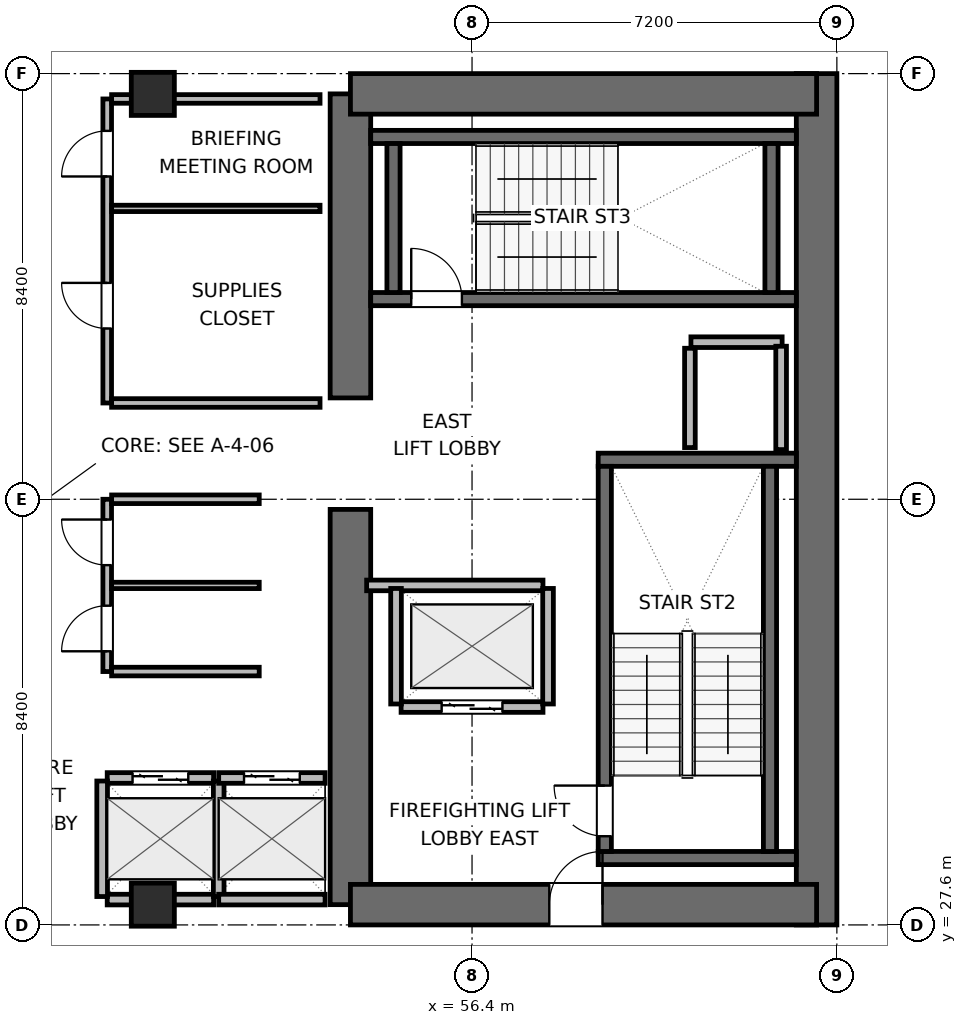
"""IFC4 building model, lengths in metres.
Left out: names, types, materials, properties, quantities, classifications, styles, units other than length and angle.
Written with IfcOpenShell. Run it as: python <this file> out.ifc"""

import sys

from ifc_helpers import new_model, si_unit, direction, frame, frame_2d, origin, origin_2d, place, context, subcontext, project, spatial, rectangle, extrude, element, fill, save


model = new_model("IFC4")
c1 = context("Model", 3, precision=1e-05, world=origin(), true_north=direction((0.0, 1.0)))
c2 = subcontext(c1, "Body", "Model", "MODEL_VIEW")
j1 = project(units=[si_unit("LENGTHUNIT", "METRE"), si_unit("PLANEANGLEUNIT", "RADIAN")], contexts=[c1])
p1 = place(None, origin())
s1 = spatial("IfcSite", under=j1, at=p1, CompositionType="ELEMENT")
p2 = place(p1, origin())
s2 = spatial("IfcBuilding", under=s1, at=p2, CompositionType="ELEMENT")
p3 = place(p2, frame((0.0, 0.0, 109.2)))
s3 = spatial("IfcBuildingStorey", under=s2, at=p3, CompositionType="ELEMENT", Elevation=109.2)
p4 = place(p3, frame((54.0, 28.0, 0.0), z_axis=(0.0, 0.0, 1.0), x_axis=(0.0, 1.0, 0.0)))
e1 = element("IfcWall", 1, at=p4, inside=s3, PredefinedType="SHEAR", context=c2, shape_type="SweptSolid", body=[
    extrude(rectangle(XDim=7.8, YDim=0.8, at=frame_2d((3.9, 0.0))), origin(), (0.0, 0.0, 1.0), 3.9),
])
p5 = place(p3, frame((54.0, 38.0, 0.0), z_axis=(0.0, 0.0, 1.0), x_axis=(0.0, 1.0, 0.0)))
e2 = element("IfcWall", 2, at=p5, inside=s3, PredefinedType="SHEAR", context=c2, shape_type="SweptSolid", body=[
    extrude(rectangle(XDim=6.0, YDim=0.8, at=frame_2d((3.0, 0.0))), origin(), (0.0, 0.0, 1.0), 3.9),
])
p6 = place(p3, frame((63.2, 27.6, 0.0), z_axis=(0.0, 0.0, 1.0), x_axis=(0.0, 1.0, 0.0)))
e3 = element("IfcWall", 3, at=p6, inside=s3, PredefinedType="SHEAR", context=c2, shape_type="SweptSolid", body=[
    extrude(rectangle(XDim=16.8, YDim=0.8, at=frame_2d((8.4, 0.0))), origin(), (0.0, 0.0, 1.0), 3.9),
])
p7 = place(p3, frame((54.0, 28.0, 0.0), z_axis=(0.0, 0.0, 1.0), x_axis=(1.0, 0.0, 0.0)))
e4 = element("IfcWall", 4, at=p7, inside=s3, PredefinedType="SHEAR", context=c2, shape_type="SweptSolid", body=[
    extrude(rectangle(XDim=9.2, YDim=0.8, at=frame_2d((4.6, 0.0))), origin(), (0.0, 0.0, 1.0), 3.9),
])
p8 = place(p7, frame((3.925, 0.0, 0.0)))
e5 = element("IfcOpeningElement", 5, at=p8, cuts=e4, PredefinedType="OPENING", context=c2, shape_type="SweptSolid", body=[
    extrude(rectangle(XDim=1.05, YDim=2.04, at=frame_2d((0.525, 1.02))), frame((0.0, 0.41, 0.0), z_axis=(0.0, -1.0, 0.0), x_axis=(1.0, 0.0, 0.0)), (0.0, 0.0, 1.0), 0.82),
])
p9 = place(p3, frame((54.0, 44.0, 0.0), z_axis=(0.0, 0.0, 1.0), x_axis=(1.0, 0.0, 0.0)))
e6 = element("IfcWall", 6, at=p9, inside=s3, PredefinedType="SHEAR", context=c2, shape_type="SweptSolid", body=[
    extrude(rectangle(XDim=9.2, YDim=0.8, at=frame_2d((4.6, 0.0))), origin(), (0.0, 0.0, 1.0), 3.9),
])
for number, where, z_axis, x_axis in (
    (7, (58.89, 28.92, 0.0), (0.0, 0.0, 1.0), (1.0, 0.0, 0.0)),
    (8, (58.89, 36.78, 0.0), (0.0, 0.0, 1.0), (1.0, 0.0, 0.0)),
):
    element("IfcWall", number, at=place(p3, frame(where, z_axis=z_axis, x_axis=x_axis)), inside=s3, PredefinedType="SHEAR", context=c2, shape_type="SweptSolid", body=[
        extrude(rectangle(XDim=3.91, YDim=0.26, at=frame_2d((1.955, 0.0))), origin(), (0.0, 0.0, 1.0), 3.9),
    ])
p10 = place(p3, frame((59.02, 29.05, 0.0), z_axis=(0.0, 0.0, 1.0), x_axis=(0.0, 1.0, 0.0)))
e9 = element("IfcWall", 9, at=p10, inside=s3, PredefinedType="SHEAR", context=c2, shape_type="SweptSolid", body=[
    extrude(rectangle(XDim=7.6, YDim=0.26, at=frame_2d((3.8, 0.0))), origin(), (0.0, 0.0, 1.0), 3.9),
])
p11 = place(p10, frame((0.3, 0.0, 0.0)))
e10 = element("IfcOpeningElement", 10, at=p11, cuts=e9, PredefinedType="OPENING", context=c2, shape_type="SweptSolid", body=[
    extrude(rectangle(XDim=1.0, YDim=2.04, at=frame_2d((0.5, 1.02))), frame((0.0, 0.14, 0.0), z_axis=(0.0, -1.0, 0.0), x_axis=(1.0, 0.0, 0.0)), (0.0, 0.0, 1.0), 0.28),
])
p12 = place(p3, frame((62.28, 29.05, 0.0), z_axis=(0.0, 0.0, 1.0), x_axis=(0.0, 1.0, 0.0)))
e11 = element("IfcWall", 11, at=p12, inside=s3, PredefinedType="SHEAR", context=c2, shape_type="SweptSolid", body=[
    extrude(rectangle(XDim=7.6, YDim=0.26, at=frame_2d((3.8, 0.0))), origin(), (0.0, 0.0, 1.0), 3.9),
])
p13 = place(p3, frame((54.4, 39.95, 0.0), z_axis=(0.0, 0.0, 1.0), x_axis=(1.0, 0.0, 0.0)))
e12 = element("IfcWall", 12, at=p13, inside=s3, PredefinedType="SHEAR", context=c2, shape_type="SweptSolid", body=[
    extrude(rectangle(XDim=8.4, YDim=0.26, at=frame_2d((4.2, 0.0))), origin(), (0.0, 0.0, 1.0), 3.9),
])
p14 = place(p13, frame((0.8, 0.0, 0.0)))
e13 = element("IfcOpeningElement", 13, at=p14, cuts=e12, PredefinedType="OPENING", context=c2, shape_type="SweptSolid", body=[
    extrude(rectangle(XDim=1.0, YDim=2.04, at=frame_2d((0.5, 1.02))), frame((0.0, 0.14, 0.0), z_axis=(0.0, -1.0, 0.0), x_axis=(1.0, 0.0, 0.0)), (0.0, 0.0, 1.0), 0.28),
])
p15 = place(p3, frame((54.4, 43.15, 0.0), z_axis=(0.0, 0.0, 1.0), x_axis=(1.0, 0.0, 0.0)))
e14 = element("IfcWall", 14, at=p15, inside=s3, PredefinedType="SHEAR", context=c2, shape_type="SweptSolid", body=[
    extrude(rectangle(XDim=8.4, YDim=0.26, at=frame_2d((4.2, 0.0))), origin(), (0.0, 0.0, 1.0), 3.9),
])
for number, where, z_axis, x_axis in (
    (15, (54.85, 40.08, 0.0), (0.0, 0.0, 1.0), (0.0, 1.0, 0.0)),
    (16, (62.31, 40.08, 0.0), (0.0, 0.0, 1.0), (0.0, 1.0, 0.0)),
):
    element("IfcWall", number, at=place(p3, frame(where, z_axis=z_axis, x_axis=x_axis)), inside=s3, PredefinedType="SHEAR", context=c2, shape_type="SweptSolid", body=[
        extrude(rectangle(XDim=2.94, YDim=0.26, at=frame_2d((1.47, 0.0))), origin(), (0.0, 0.0, 1.0), 3.9),
    ])
for number, where, z_axis, x_axis in (
    (17, (50.1, 28.0, 0.0), (0.0, 0.0, 1.0), (1.0, 0.0, 0.0)),
    (18, (50.1, 44.0, 0.0), (0.0, 0.0, 1.0), (1.0, 0.0, 0.0)),
):
    element("IfcColumn", number, at=place(p3, frame(where, z_axis=z_axis, x_axis=x_axis)), inside=s3, PredefinedType="COLUMN", context=c2, shape_type="SweptSolid", body=[
        extrude(rectangle(XDim=0.85, YDim=0.85, at=origin_2d()), origin(), (0.0, 0.0, 1.0), 3.9),
    ])
p16 = place(p3, frame((60.72, 39.1, 0.0), z_axis=(0.0, 0.0, 1.0), x_axis=(1.0, 0.0, 0.0)))
e19 = element("IfcWall", 19, at=p16, inside=s3, PredefinedType="PARTITIONING", context=c2, shape_type="SweptSolid", body=[
    extrude(rectangle(XDim=1.8, YDim=0.21, at=frame_2d((0.9, 0.0))), origin(), (0.0, 0.0, 1.0), 3.64),
])
p17 = place(p3, frame((60.7, 37.02, 0.0), z_axis=(0.0, 0.0, 1.0), x_axis=(0.0, 1.0, 0.0)))
e20 = element("IfcWall", 20, at=p17, inside=s3, PredefinedType="PARTITIONING", context=c2, shape_type="SweptSolid", body=[
    extrude(rectangle(XDim=1.96, YDim=0.21, at=frame_2d((0.98, 0.0))), origin(), (0.0, 0.0, 1.0), 3.64),
])
p18 = place(p3, frame((62.5, 36.98, 0.0), z_axis=(0.0, 0.0, 1.0), x_axis=(0.0, 1.0, 0.0)))
e21 = element("IfcWall", 21, at=p18, inside=s3, PredefinedType="PARTITIONING", context=c2, shape_type="SweptSolid", body=[
    extrude(rectangle(XDim=2.04, YDim=0.21, at=frame_2d((1.02, 0.0))), origin(), (0.0, 0.0, 1.0), 3.64),
])
p19 = place(p3, frame((55.0, 31.9, 0.0), z_axis=(0.0, 0.0, 1.0), x_axis=(1.0, 0.0, 0.0)))
e22 = element("IfcWall", 22, at=p19, inside=s3, PredefinedType="PARTITIONING", context=c2, shape_type="SweptSolid", body=[
    extrude(rectangle(XDim=2.8, YDim=0.21, at=frame_2d((1.4, 0.0))), origin(), (0.0, 0.0, 1.0), 3.64),
])
p20 = place(p19, frame((0.8, 0.0, 0.0)))
e23 = element("IfcOpeningElement", 23, at=p20, cuts=e22, PredefinedType="OPENING", context=c2, shape_type="SweptSolid", body=[
    extrude(rectangle(XDim=1.2, YDim=2.04, at=frame_2d((0.6, 1.02))), frame((0.0, 0.115, 0.0), z_axis=(0.0, -1.0, 0.0), x_axis=(1.0, 0.0, 0.0)), (0.0, 0.0, 1.0), 0.23),
])
p21 = place(p3, frame((54.32, 34.3, 0.0), z_axis=(0.0, 0.0, 1.0), x_axis=(1.0, 0.0, 0.0)))
e24 = element("IfcWall", 24, at=p21, inside=s3, PredefinedType="PARTITIONING", context=c2, shape_type="SweptSolid", body=[
    extrude(rectangle(XDim=3.48, YDim=0.21, at=frame_2d((1.74, 0.0))), origin(), (0.0, 0.0, 1.0), 3.64),
])
for number, where, z_axis, x_axis in (
    (25, (54.9, 31.96, 0.0), (0.0, 0.0, 1.0), (0.0, 1.0, 0.0)),
    (26, (57.9, 31.96, 0.0), (0.0, 0.0, 1.0), (0.0, 1.0, 0.0)),
):
    element("IfcWall", number, at=place(p3, frame(where, z_axis=z_axis, x_axis=x_axis)), inside=s3, PredefinedType="PARTITIONING", context=c2, shape_type="SweptSolid", body=[
        extrude(rectangle(XDim=2.28, YDim=0.21, at=frame_2d((1.14, 0.0))), origin(), (0.0, 0.0, 1.0), 3.64),
    ])
p22 = place(p3, frame((49.2, 30.5, 0.0), z_axis=(0.0, 0.0, 1.0), x_axis=(1.0, 0.0, 0.0)))
e27 = element("IfcWall", 27, at=p22, inside=s3, PredefinedType="PARTITIONING", context=c2, shape_type="SweptSolid", body=[
    extrude(rectangle(XDim=2.1, YDim=0.21, at=frame_2d((1.05, 0.0))), origin(), (0.0, 0.0, 1.0), 3.64),
])
p23 = place(p22, frame((0.5, 0.0, 0.0)))
e28 = element("IfcOpeningElement", 28, at=p23, cuts=e27, PredefinedType="OPENING", context=c2, shape_type="SweptSolid", body=[
    extrude(rectangle(XDim=1.1, YDim=2.04, at=frame_2d((0.55, 1.02))), frame((0.0, 0.115, 0.0), z_axis=(0.0, -1.0, 0.0), x_axis=(1.0, 0.0, 0.0)), (0.0, 0.0, 1.0), 0.23),
])
p24 = place(p3, frame((49.2, 28.1, 0.0), z_axis=(0.0, 0.0, 1.0), x_axis=(1.0, 0.0, 0.0)))
e29 = element("IfcWall", 29, at=p24, inside=s3, PredefinedType="PARTITIONING", context=c2, shape_type="SweptSolid", body=[
    extrude(rectangle(XDim=2.1, YDim=0.21, at=frame_2d((1.05, 0.0))), origin(), (0.0, 0.0, 1.0), 2.525),
])
for number, where, z_axis, x_axis in (
    (30, (49.1, 28.16, 0.0), (0.0, 0.0, 1.0), (0.0, 1.0, 0.0)),
    (31, (51.4, 28.16, 0.0), (0.0, 0.0, 1.0), (0.0, 1.0, 0.0)),
):
    element("IfcWall", number, at=place(p3, frame(where, z_axis=z_axis, x_axis=x_axis)), inside=s3, PredefinedType="PARTITIONING", context=c2, shape_type="SweptSolid", body=[
        extrude(rectangle(XDim=2.28, YDim=0.21, at=frame_2d((1.14, 0.0))), origin(), (0.0, 0.0, 1.0), 3.64),
    ])
p25 = place(p3, frame((51.4, 30.5, 0.0), z_axis=(0.0, 0.0, 1.0), x_axis=(1.0, 0.0, 0.0)))
e32 = element("IfcWall", 32, at=p25, inside=s3, PredefinedType="PARTITIONING", context=c2, shape_type="SweptSolid", body=[
    extrude(rectangle(XDim=2.1, YDim=0.21, at=frame_2d((1.05, 0.0))), origin(), (0.0, 0.0, 1.0), 3.64),
])
p26 = place(p25, frame((0.5, 0.0, 0.0)))
e33 = element("IfcOpeningElement", 33, at=p26, cuts=e32, PredefinedType="OPENING", context=c2, shape_type="SweptSolid", body=[
    extrude(rectangle(XDim=1.1, YDim=2.04, at=frame_2d((0.55, 1.02))), frame((0.0, 0.115, 0.0), z_axis=(0.0, -1.0, 0.0), x_axis=(1.0, 0.0, 0.0)), (0.0, 0.0, 1.0), 0.23),
])
p27 = place(p3, frame((51.4, 28.1, 0.0), z_axis=(0.0, 0.0, 1.0), x_axis=(1.0, 0.0, 0.0)))
e34 = element("IfcWall", 34, at=p27, inside=s3, PredefinedType="PARTITIONING", context=c2, shape_type="SweptSolid", body=[
    extrude(rectangle(XDim=2.1, YDim=0.21, at=frame_2d((1.05, 0.0))), origin(), (0.0, 0.0, 1.0), 2.525),
])
p28 = place(p3, frame((49.2, 32.6, 0.0), z_axis=(0.0, 0.0, 1.0), x_axis=(0.0, 1.0, 0.0)))
e35 = element("IfcWall", 35, at=p28, inside=s3, PredefinedType="PARTITIONING", context=c2, shape_type="SweptSolid", body=[
    extrude(rectangle(XDim=3.4, YDim=0.17, at=frame_2d((1.7, 0.0))), origin(), (0.0, 0.0, 1.0), 3.64),
])
p29 = place(p28, frame((0.4, 0.0, 0.0)))
e36 = element("IfcOpeningElement", 36, at=p29, cuts=e35, PredefinedType="OPENING", context=c2, shape_type="SweptSolid", body=[
    extrude(rectangle(XDim=0.9, YDim=2.02, at=frame_2d((0.45, 1.01))), frame((0.0, 0.095, 0.0), z_axis=(0.0, -1.0, 0.0), x_axis=(1.0, 0.0, 0.0)), (0.0, 0.0, 1.0), 0.19),
])
p30 = place(p28, frame((2.1, 0.0, 0.0)))
e37 = element("IfcOpeningElement", 37, at=p30, cuts=e35, PredefinedType="OPENING", context=c2, shape_type="SweptSolid", body=[
    extrude(rectangle(XDim=0.9, YDim=2.02, at=frame_2d((0.45, 1.01))), frame((0.0, 0.095, 0.0), z_axis=(0.0, -1.0, 0.0), x_axis=(1.0, 0.0, 0.0)), (0.0, 0.0, 1.0), 0.19),
])
for number, where, z_axis, x_axis in (
    (38, (49.287, 32.6, 0.0), (0.0, 0.0, 1.0), (1.0, 0.0, 0.0)),
    (39, (49.287, 36.0, 0.0), (0.0, 0.0, 1.0), (1.0, 0.0, 0.0)),
):
    element("IfcWall", number, at=place(p3, frame(where, z_axis=z_axis, x_axis=x_axis)), inside=s3, PredefinedType="PARTITIONING", context=c2, shape_type="SweptSolid", body=[
        extrude(rectangle(XDim=2.913, YDim=0.17, at=frame_2d((1.457, 0.0))), origin(), (0.0, 0.0, 1.0), 3.64),
    ])
p31 = place(p3, frame((49.287, 34.3, 0.0), z_axis=(0.0, 0.0, 1.0), x_axis=(1.0, 0.0, 0.0)))
e40 = element("IfcWall", 40, at=p31, inside=s3, PredefinedType="PARTITIONING", context=c2, shape_type="SweptSolid", body=[
    extrude(rectangle(XDim=2.913, YDim=0.125, at=frame_2d((1.457, 0.0))), origin(), (0.0, 0.0, 1.0), 3.64),
])
p32 = place(p3, frame((49.2, 37.9, 0.0), z_axis=(0.0, 0.0, 1.0), x_axis=(0.0, 1.0, 0.0)))
e41 = element("IfcWall", 41, at=p32, inside=s3, PredefinedType="PARTITIONING", context=c2, shape_type="SweptSolid", body=[
    extrude(rectangle(XDim=6.0, YDim=0.17, at=frame_2d((3.0, 0.0))), origin(), (0.0, 0.0, 1.0), 3.64),
])
p33 = place(p32, frame((1.47, 0.0, 0.0)))
e42 = element("IfcOpeningElement", 42, at=p33, cuts=e41, PredefinedType="OPENING", context=c2, shape_type="SweptSolid", body=[
    extrude(rectangle(XDim=0.9, YDim=2.02, at=frame_2d((0.45, 1.01))), frame((0.0, 0.095, 0.0), z_axis=(0.0, -1.0, 0.0), x_axis=(1.0, 0.0, 0.0)), (0.0, 0.0, 1.0), 0.19),
])
p34 = place(p32, frame((4.47, 0.0, 0.0)))
e43 = element("IfcOpeningElement", 43, at=p34, cuts=e41, PredefinedType="OPENING", context=c2, shape_type="SweptSolid", body=[
    extrude(rectangle(XDim=0.9, YDim=2.02, at=frame_2d((0.45, 1.01))), frame((0.0, 0.095, 0.0), z_axis=(0.0, -1.0, 0.0), x_axis=(1.0, 0.0, 0.0)), (0.0, 0.0, 1.0), 0.19),
])
p35 = place(p3, frame((49.287, 37.9, 0.0), z_axis=(0.0, 0.0, 1.0), x_axis=(1.0, 0.0, 0.0)))
e44 = element("IfcWall", 44, at=p35, inside=s3, PredefinedType="PARTITIONING", context=c2, shape_type="SweptSolid", body=[
    extrude(rectangle(XDim=4.113, YDim=0.17, at=frame_2d((2.056, 0.0))), origin(), (0.0, 0.0, 1.0), 3.64),
])
p36 = place(p3, frame((49.287, 43.9, 0.0), z_axis=(0.0, 0.0, 1.0), x_axis=(1.0, 0.0, 0.0)))
e45 = element("IfcWall", 45, at=p36, inside=s3, PredefinedType="PARTITIONING", context=c2, shape_type="SweptSolid", body=[
    extrude(rectangle(XDim=4.113, YDim=0.17, at=frame_2d((2.056, 0.0))), origin(), (0.0, 0.0, 1.0), 2.525),
])
p37 = place(p3, frame((49.287, 41.74, 0.0), z_axis=(0.0, 0.0, 1.0), x_axis=(1.0, 0.0, 0.0)))
e46 = element("IfcWall", 46, at=p37, inside=s3, PredefinedType="PARTITIONING", context=c2, shape_type="SweptSolid", body=[
    extrude(rectangle(XDim=4.113, YDim=0.125, at=frame_2d((2.056, 0.0))), origin(), (0.0, 0.0, 1.0), 3.64),
])
p38 = place(p11, origin())
e47 = element("IfcDoor", 47, at=p38, inside=s3, OperationType="SINGLE_SWING_RIGHT", PredefinedType="DOOR", context=c2, shape_type="SweptSolid", body=[
    extrude(rectangle(XDim=1.0, YDim=2.04, at=frame_2d((0.5, 1.02))), frame((0.0, 0.025, 0.0), z_axis=(0.0, -1.0, 0.0), x_axis=(1.0, 0.0, 0.0)), (0.0, 0.0, 1.0), 0.05),
])
fill(e10, e47)
p39 = place(p14, origin())
e48 = element("IfcDoor", 48, at=p39, inside=s3, OperationType="SINGLE_SWING_LEFT", PredefinedType="DOOR", context=c2, shape_type="SweptSolid", body=[
    extrude(rectangle(XDim=1.0, YDim=2.04, at=frame_2d((0.5, 1.02))), frame((0.0, 0.025, 0.0), z_axis=(0.0, -1.0, 0.0), x_axis=(1.0, 0.0, 0.0)), (0.0, 0.0, 1.0), 0.05),
])
fill(e13, e48)
p40 = place(p20, origin())
e49 = element("IfcDoor", 49, at=p40, inside=s3, OperationType="DOUBLE_DOOR_SLIDING", PredefinedType="DOOR", context=c2, shape_type="SweptSolid", body=[
    extrude(rectangle(XDim=1.2, YDim=2.04, at=frame_2d((0.6, 1.02))), frame((0.0, 0.025, 0.0), z_axis=(0.0, -1.0, 0.0), x_axis=(1.0, 0.0, 0.0)), (0.0, 0.0, 1.0), 0.05),
])
fill(e23, e49)
p41 = place(p23, origin())
e50 = element("IfcDoor", 50, at=p41, inside=s3, OperationType="DOUBLE_DOOR_SLIDING", PredefinedType="DOOR", context=c2, shape_type="SweptSolid", body=[
    extrude(rectangle(XDim=1.1, YDim=2.04, at=frame_2d((0.55, 1.02))), frame((0.0, 0.025, 0.0), z_axis=(0.0, -1.0, 0.0), x_axis=(1.0, 0.0, 0.0)), (0.0, 0.0, 1.0), 0.05),
])
fill(e28, e50)
p42 = place(p26, origin())
e51 = element("IfcDoor", 51, at=p42, inside=s3, OperationType="DOUBLE_DOOR_SLIDING", PredefinedType="DOOR", context=c2, shape_type="SweptSolid", body=[
    extrude(rectangle(XDim=1.1, YDim=2.04, at=frame_2d((0.55, 1.02))), frame((0.0, 0.025, 0.0), z_axis=(0.0, -1.0, 0.0), x_axis=(1.0, 0.0, 0.0)), (0.0, 0.0, 1.0), 0.05),
])
fill(e33, e51)
p43 = place(p8, origin())
e52 = element("IfcDoor", 52, at=p43, inside=s3, OperationType="SINGLE_SWING_RIGHT", PredefinedType="DOOR", context=c2, shape_type="SweptSolid", body=[
    extrude(rectangle(XDim=1.05, YDim=2.04, at=frame_2d((0.525, 1.02))), frame((0.0, 0.025, 0.0), z_axis=(0.0, -1.0, 0.0), x_axis=(1.0, 0.0, 0.0)), (0.0, 0.0, 1.0), 0.05),
])
fill(e5, e52)
p44 = place(p29, origin())
e53 = element("IfcDoor", 53, at=p44, inside=s3, OperationType="SINGLE_SWING_LEFT", PredefinedType="DOOR", context=c2, shape_type="SweptSolid", body=[
    extrude(rectangle(XDim=0.9, YDim=2.02, at=frame_2d((0.45, 1.01))), frame((0.0, 0.025, 0.0), z_axis=(0.0, -1.0, 0.0), x_axis=(1.0, 0.0, 0.0)), (0.0, 0.0, 1.0), 0.05),
])
fill(e36, e53)
p45 = place(p30, origin())
e54 = element("IfcDoor", 54, at=p45, inside=s3, OperationType="SINGLE_SWING_RIGHT", PredefinedType="DOOR", context=c2, shape_type="SweptSolid", body=[
    extrude(rectangle(XDim=0.9, YDim=2.02, at=frame_2d((0.45, 1.01))), frame((0.0, 0.025, 0.0), z_axis=(0.0, -1.0, 0.0), x_axis=(1.0, 0.0, 0.0)), (0.0, 0.0, 1.0), 0.05),
])
fill(e37, e54)
p46 = place(p33, origin())
e55 = element("IfcDoor", 55, at=p46, inside=s3, OperationType="SINGLE_SWING_RIGHT", PredefinedType="DOOR", context=c2, shape_type="SweptSolid", body=[
    extrude(rectangle(XDim=0.9, YDim=2.02, at=frame_2d((0.45, 1.01))), frame((0.0, 0.025, 0.0), z_axis=(0.0, -1.0, 0.0), x_axis=(1.0, 0.0, 0.0)), (0.0, 0.0, 1.0), 0.05),
])
fill(e42, e55)
p47 = place(p34, origin())
e56 = element("IfcDoor", 56, at=p47, inside=s3, OperationType="SINGLE_SWING_LEFT", PredefinedType="DOOR", context=c2, shape_type="SweptSolid", body=[
    extrude(rectangle(XDim=0.9, YDim=2.02, at=frame_2d((0.45, 1.01))), frame((0.0, 0.025, 0.0), z_axis=(0.0, -1.0, 0.0), x_axis=(1.0, 0.0, 0.0)), (0.0, 0.0, 1.0), 0.05),
])
fill(e43, e56)
save(model, sys.argv[1])
